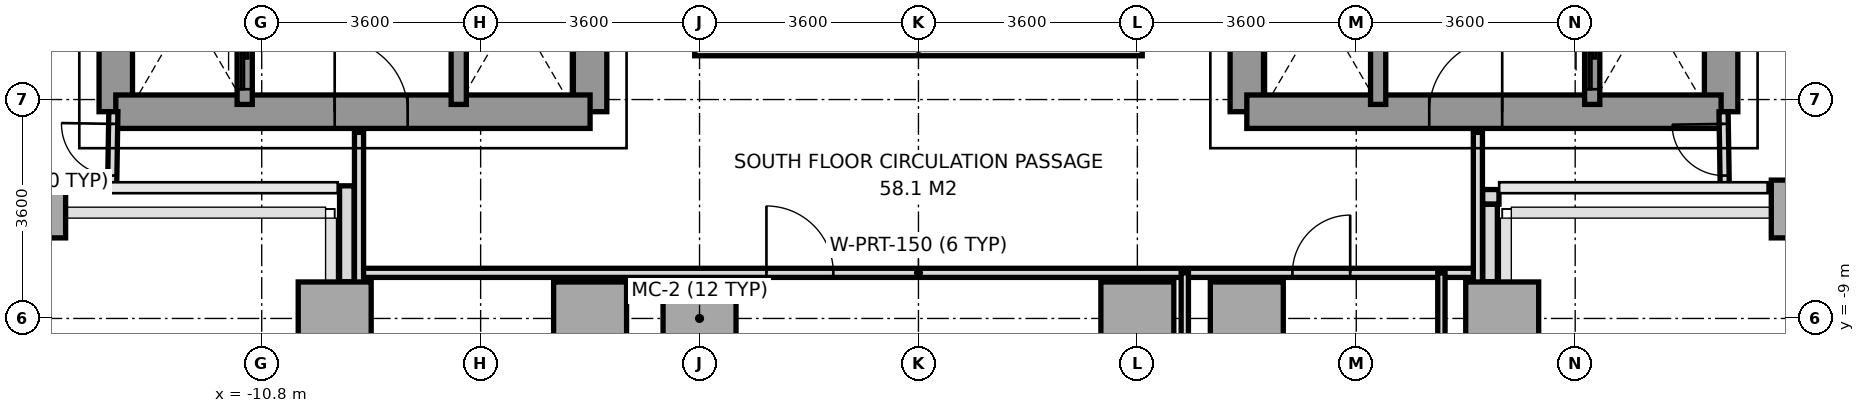
"""IFC4 building model, lengths in metres.
Left out: names, types, materials, properties, quantities, classifications, styles, units other than length and angle.
Written with IfcOpenShell. Run it as: python <this file> out.ifc"""

import sys

from ifc_helpers import new_model, si_unit, direction, frame, frame_2d, origin, origin_2d, place, context, subcontext, project, spatial, rectangle, extrude, source, transform, mapped, element, fill, save


model = new_model("IFC4")
c1 = context("Model", 3, precision=1e-05, world=origin(), true_north=direction((0.0, 1.0)))
c2 = subcontext(c1, "Body", "Model", "MODEL_VIEW")
j1 = project(units=[si_unit("LENGTHUNIT", "METRE"), si_unit("PLANEANGLEUNIT", "RADIAN")], contexts=[c1])
p1 = place(None, origin())
s1 = spatial("IfcSite", under=j1, at=p1, CompositionType="ELEMENT")
p2 = place(p1, origin())
s2 = spatial("IfcBuilding", under=s1, at=p2, CompositionType="ELEMENT")
p3 = place(p2, frame((0.0, 0.0, 68.0)))
s3 = spatial("IfcBuildingStorey", under=s2, at=p3, CompositionType="ELEMENT", Elevation=68.0)
m1 = source(origin(), c2, "Body", "SweptSolid", [
    extrude(rectangle(XDim=0.75, YDim=0.95, at=origin_2d()), origin(), (0.0, 0.0, 1.0), 3.2),
])
p4 = place(p3, frame((-14.4, -7.2, 0.0), z_axis=(0.0, 0.0, 1.0), x_axis=(1.0, 0.0, 0.0)))
e1 = element("IfcColumn", 1, at=p4, inside=s3, PredefinedType="COLUMN", context=c2, shape_type="MappedRepresentation", body=[
    mapped(m1, transform((0.0, 0.0, 0.0), x_axis=(1.0, 0.0, 0.0), y_axis=(0.0, 1.0, 0.0), z_axis=(0.0, 0.0, 1.0), scale=1.0)),
])
m2 = source(origin(), c2, "Body", "SweptSolid", [
    extrude(rectangle(XDim=1.2, YDim=1.2, at=origin_2d()), origin(), (0.0, 0.0, 1.0), 3.2),
])
for number, where, z_axis, x_axis in (
    (2, (-9.6, -9.0, 0.0), (0.0, 0.0, 1.0), (1.0, 0.0, 0.0)),
    (3, (-5.4, -9.0, 0.0), (0.0, 0.0, 1.0), (1.0, 0.0, 0.0)),
    (4, (-3.6, -9.0, 0.0), (0.0, 0.0, 1.0), (1.0, 0.0, 0.0)),
    (5, (3.6, -9.0, 0.0), (0.0, 0.0, 1.0), (1.0, 0.0, 0.0)),
    (6, (5.4, -9.0, 0.0), (0.0, 0.0, 1.0), (1.0, 0.0, 0.0)),
    (7, (9.6, -9.0, 0.0), (0.0, 0.0, 1.0), (1.0, 0.0, 0.0)),
):
    element("IfcColumn", number, at=place(p3, frame(where, z_axis=z_axis, x_axis=x_axis)), inside=s3, PredefinedType="COLUMN", context=c2, shape_type="MappedRepresentation", body=[
        mapped(m2, transform((0.0, 0.0, 0.0), x_axis=(1.0, 0.0, 0.0), y_axis=(0.0, 1.0, 0.0), z_axis=(0.0, 0.0, 1.0), scale=1.0)),
    ])
p5 = place(p3, frame((14.4, -7.2, 0.0), z_axis=(0.0, 0.0, 1.0), x_axis=(1.0, 0.0, 0.0)))
e8 = element("IfcColumn", 8, at=p5, inside=s3, PredefinedType="COLUMN", context=c2, shape_type="MappedRepresentation", body=[
    mapped(m1, transform((0.0, 0.0, 0.0), x_axis=(1.0, 0.0, 0.0), y_axis=(0.0, 1.0, 0.0), z_axis=(0.0, 0.0, 1.0), scale=1.0)),
])
p6 = place(p3, frame((9.547, -7.0, 0.0), z_axis=(0.0, 0.0, 1.0), x_axis=(-1.0, 0.0, 0.0)))
e9 = element("IfcWall", 9, at=p6, inside=s3, PredefinedType="PARAPET", context=c2, shape_type="SweptSolid", body=[
    extrude(rectangle(XDim=0.269, YDim=0.24, at=frame_2d((0.135, 0.0))), origin(), (0.0, 0.0, 1.0), 1.15),
])
p7 = place(p3, frame((9.4, -7.123, 0.0), z_axis=(0.0, 0.0, 1.0), x_axis=(0.0, -1.0, 0.0)))
e10 = element("IfcWall", 10, at=p7, inside=s3, PredefinedType="PARAPET", context=c2, shape_type="SweptSolid", body=[
    extrude(rectangle(XDim=1.274, YDim=0.24, at=frame_2d((0.637, 0.0))), origin(), (0.0, 0.0, 1.0), 1.15),
])
p8 = place(p3, frame((-9.4, -8.397, 0.0), z_axis=(0.0, 0.0, 1.0), x_axis=(0.0, 1.0, 0.0)))
e11 = element("IfcWall", 11, at=p8, inside=s3, PredefinedType="PARAPET", context=c2, shape_type="SweptSolid", body=[
    extrude(rectangle(XDim=1.578, YDim=0.24, at=frame_2d((0.789, 0.0))), origin(), (0.0, 0.0, 1.0), 1.15),
])
p9 = place(p3, frame((-13.2, -5.6, 0.0), z_axis=(0.0, 0.0, 1.0), x_axis=(0.0, 1.0, 0.0)))
e12 = element("IfcWall", 12, at=p9, inside=s3, PredefinedType="SHEAR", context=c2, shape_type="SweptSolid", body=[
    extrude(rectangle(XDim=11.2, YDim=0.55, at=frame_2d((5.6, 0.0))), origin(), (0.0, 0.0, 1.0), 3.2),
])
p10 = place(p3, frame((-5.4, -5.6, 0.0), z_axis=(0.0, 0.0, 1.0), x_axis=(0.0, 1.0, 0.0)))
e13 = element("IfcWall", 13, at=p10, inside=s3, PredefinedType="SHEAR", context=c2, shape_type="SweptSolid", body=[
    extrude(rectangle(XDim=12.5, YDim=0.55, at=frame_2d((6.25, 0.0))), origin(), (0.0, 0.0, 1.0), 3.2),
])
p11 = place(p10, frame((4.55, 0.0, 0.0)))
e14 = element("IfcOpeningElement", 14, at=p11, cuts=e13, PredefinedType="OPENING", context=c2, shape_type="SweptSolid", body=[
    extrude(rectangle(XDim=1.2, YDim=2.2, at=frame_2d((0.6, 1.1))), frame((0.0, 0.285, 0.0), z_axis=(0.0, -1.0, 0.0), x_axis=(1.0, 0.0, 0.0)), (0.0, 0.0, 1.0), 0.57),
])
p12 = place(p3, frame((-13.2, -5.6, 0.0), z_axis=(0.0, 0.0, 1.0), x_axis=(1.0, 0.0, 0.0)))
e15 = element("IfcWall", 15, at=p12, inside=s3, PredefinedType="SHEAR", context=c2, shape_type="SweptSolid", body=[
    extrude(rectangle(XDim=7.8, YDim=0.55, at=frame_2d((3.9, 0.0))), origin(), (0.0, 0.0, 1.0), 3.2),
])
p13 = place(p12, frame((3.6, 0.0, 0.0)))
e16 = element("IfcOpeningElement", 16, at=p13, cuts=e15, PredefinedType="OPENING", context=c2, shape_type="SweptSolid", body=[
    extrude(rectangle(XDim=1.2, YDim=2.2, at=frame_2d((0.6, 1.1))), frame((0.0, 0.285, 0.0), z_axis=(0.0, -1.0, 0.0), x_axis=(1.0, 0.0, 0.0)), (0.0, 0.0, 1.0), 0.57),
])
p14 = place(p3, frame((13.2, -5.6, 0.0), z_axis=(0.0, 0.0, 1.0), x_axis=(0.0, 1.0, 0.0)))
e17 = element("IfcWall", 17, at=p14, inside=s3, PredefinedType="SHEAR", context=c2, shape_type="SweptSolid", body=[
    extrude(rectangle(XDim=11.2, YDim=0.55, at=frame_2d((5.6, 0.0))), origin(), (0.0, 0.0, 1.0), 3.2),
])
p15 = place(p3, frame((5.4, -5.6, 0.0), z_axis=(0.0, 0.0, 1.0), x_axis=(0.0, 1.0, 0.0)))
e18 = element("IfcWall", 18, at=p15, inside=s3, PredefinedType="SHEAR", context=c2, shape_type="SweptSolid", body=[
    extrude(rectangle(XDim=12.5, YDim=0.55, at=frame_2d((6.25, 0.0))), origin(), (0.0, 0.0, 1.0), 3.2),
])
p16 = place(p15, frame((4.55, 0.0, 0.0)))
e19 = element("IfcOpeningElement", 19, at=p16, cuts=e18, PredefinedType="OPENING", context=c2, shape_type="SweptSolid", body=[
    extrude(rectangle(XDim=1.2, YDim=2.2, at=frame_2d((0.6, 1.1))), frame((0.0, 0.285, 0.0), z_axis=(0.0, -1.0, 0.0), x_axis=(1.0, 0.0, 0.0)), (0.0, 0.0, 1.0), 0.57),
])
p17 = place(p15, frame((7.88, 0.0, 0.0)))
e20 = element("IfcOpeningElement", 20, at=p17, cuts=e18, PredefinedType="OPENING", context=c2, shape_type="SweptSolid", body=[
    extrude(rectangle(XDim=0.8, YDim=2.1, at=frame_2d((0.4, 1.05))), frame((0.0, 0.285, 0.0), z_axis=(0.0, -1.0, 0.0), x_axis=(1.0, 0.0, 0.0)), (0.0, 0.0, 1.0), 0.57),
])
p18 = place(p3, frame((5.4, -5.6, 0.0), z_axis=(0.0, 0.0, 1.0), x_axis=(1.0, 0.0, 0.0)))
e21 = element("IfcWall", 21, at=p18, inside=s3, PredefinedType="SHEAR", context=c2, shape_type="SweptSolid", body=[
    extrude(rectangle(XDim=7.8, YDim=0.55, at=frame_2d((3.9, 0.0))), origin(), (0.0, 0.0, 1.0), 3.2),
])
p19 = place(p18, frame((3.0, 0.0, 0.0)))
e22 = element("IfcOpeningElement", 22, at=p19, cuts=e21, PredefinedType="OPENING", context=c2, shape_type="SweptSolid", body=[
    extrude(rectangle(XDim=1.2, YDim=2.2, at=frame_2d((0.6, 1.1))), frame((0.0, 0.285, 0.0), z_axis=(0.0, -1.0, 0.0), x_axis=(1.0, 0.0, 0.0)), (0.0, 0.0, 1.0), 0.57),
])
p20 = place(p3, frame((-11.08, -5.48, 0.0), z_axis=(0.0, 0.0, 1.0), x_axis=(0.0, 1.0, 0.0)))
e23 = element("IfcWall", 23, at=p20, inside=s3, PredefinedType="SOLIDWALL", context=c2, shape_type="SweptSolid", body=[
    extrude(rectangle(XDim=1.6, YDim=0.25, at=frame_2d((0.8, 0.0))), origin(), (0.0, 0.0, 1.0), 3.2),
])
p21 = place(p20, frame((0.25, 0.0, 0.0)))
e24 = element("IfcOpeningElement", 24, at=p21, cuts=e23, PredefinedType="OPENING", context=c2, shape_type="SweptSolid", body=[
    extrude(rectangle(XDim=1.1, YDim=2.2, at=frame_2d((0.55, 1.1))), frame((0.0, 0.135, 0.0), z_axis=(0.0, -1.0, 0.0), x_axis=(1.0, 0.0, 0.0)), (0.0, 0.0, 1.0), 0.27),
])
p22 = place(p3, frame((11.08, -5.48, 0.0), z_axis=(0.0, 0.0, 1.0), x_axis=(0.0, 1.0, 0.0)))
e25 = element("IfcWall", 25, at=p22, inside=s3, PredefinedType="SOLIDWALL", context=c2, shape_type="SweptSolid", body=[
    extrude(rectangle(XDim=1.6, YDim=0.25, at=frame_2d((0.8, 0.0))), origin(), (0.0, 0.0, 1.0), 3.2),
])
p23 = place(p22, frame((0.25, 0.0, 0.0)))
e26 = element("IfcOpeningElement", 26, at=p23, cuts=e25, PredefinedType="OPENING", context=c2, shape_type="SweptSolid", body=[
    extrude(rectangle(XDim=1.1, YDim=2.2, at=frame_2d((0.55, 1.1))), frame((0.0, 0.135, 0.0), z_axis=(0.0, -1.0, 0.0), x_axis=(1.0, 0.0, 0.0)), (0.0, 0.0, 1.0), 0.27),
])
for number, where, z_axis, x_axis in (
    (27, (-7.56, -5.48, 0.0), (0.0, 0.0, 1.0), (0.0, 1.0, 0.0)),
    (28, (7.56, -5.48, 0.0), (0.0, 0.0, 1.0), (0.0, 1.0, 0.0)),
):
    element("IfcWall", number, at=place(p3, frame(where, z_axis=z_axis, x_axis=x_axis)), inside=s3, PredefinedType="SOLIDWALL", context=c2, shape_type="SweptSolid", body=[
        extrude(rectangle(XDim=1.6, YDim=0.25, at=frame_2d((0.8, 0.0))), origin(), (0.0, 0.0, 1.0), 3.2),
    ])
p24 = place(p3, frame((-9.2, -8.25, 0.0), z_axis=(0.0, 0.0, 1.0), x_axis=(1.0, 0.0, 0.0)))
e29 = element("IfcWall", 29, at=p24, inside=s3, PredefinedType="PARTITIONING", context=c2, shape_type="SweptSolid", body=[
    extrude(rectangle(XDim=18.4, YDim=0.15, at=frame_2d((9.2, 0.0))), origin(), (0.0, 0.0, 1.0), 2.7),
])
p25 = place(p24, frame((15.35, 0.0, 0.0)))
e30 = element("IfcOpeningElement", 30, at=p25, cuts=e29, PredefinedType="OPENING", context=c2, shape_type="SweptSolid", body=[
    extrude(rectangle(XDim=0.95, YDim=2.15, at=frame_2d((0.475, 1.075))), frame((0.0, 0.085, 0.0), z_axis=(0.0, -1.0, 0.0), x_axis=(1.0, 0.0, 0.0)), (0.0, 0.0, 1.0), 0.17),
])
p26 = place(p24, frame((6.7, 0.0, 0.0)))
e31 = element("IfcOpeningElement", 31, at=p26, cuts=e29, PredefinedType="OPENING", context=c2, shape_type="SweptSolid", body=[
    extrude(rectangle(XDim=1.1, YDim=2.2, at=frame_2d((0.55, 1.1))), frame((0.0, 0.085, 0.0), z_axis=(0.0, -1.0, 0.0), x_axis=(1.0, 0.0, 0.0)), (0.0, 0.0, 1.0), 0.17),
])
for number, where, z_axis, x_axis in (
    (32, (-9.2, -15.68, 0.0), (0.0, 0.0, 1.0), (0.0, 1.0, 0.0)),
    (33, (9.2, -15.68, 0.0), (0.0, 0.0, 1.0), (0.0, 1.0, 0.0)),
):
    element("IfcWall", number, at=place(p3, frame(where, z_axis=z_axis, x_axis=x_axis)), inside=s3, PredefinedType="PARTITIONING", context=c2, shape_type="SweptSolid", body=[
        extrude(rectangle(XDim=9.74, YDim=0.15, at=frame_2d((4.87, 0.0))), origin(), (0.0, 0.0, 1.0), 2.71),
    ])
p27 = place(p3, frame((4.38, -11.8, 0.0), z_axis=(0.0, 0.0, 1.0), x_axis=(0.0, 1.0, 0.0)))
e34 = element("IfcWall", 34, at=p27, inside=s3, PredefinedType="PARTITIONING", context=c2, shape_type="SweptSolid", body=[
    extrude(rectangle(XDim=3.55, YDim=0.12, at=frame_2d((1.775, 0.0))), origin(), (0.0, 0.0, 1.0), 3.2),
])
p28 = place(p3, frame((8.6, -11.8, 0.0), z_axis=(0.0, 0.0, 1.0), x_axis=(0.0, 1.0, 0.0)))
e35 = element("IfcWall", 35, at=p28, inside=s3, PredefinedType="PARTITIONING", context=c2, shape_type="SweptSolid", body=[
    extrude(rectangle(XDim=3.55, YDim=0.12, at=frame_2d((1.775, 0.0))), origin(), (0.0, 0.0, 1.0), 2.71),
])
p29 = place(p3, frame((-13.26, -6.85, 0.0), z_axis=(0.0, 0.0, 1.0), x_axis=(0.016013571389, 0.999871774545, 0.0)))
e36 = element("IfcWall", 36, at=p29, inside=s3, PredefinedType="PARTITIONING", context=c2, shape_type="SweptSolid", body=[
    extrude(rectangle(XDim=1.25, YDim=0.15, at=frame_2d((0.625, 0.0))), origin(), (0.0, 0.0, 1.0), 3.2),
])
p30 = place(p29, frame((0.2, 0.0, 0.0)))
e37 = element("IfcOpeningElement", 37, at=p30, cuts=e36, PredefinedType="OPENING", context=c2, shape_type="SweptSolid", body=[
    extrude(rectangle(XDim=0.85, YDim=2.1, at=frame_2d((0.425, 1.05))), frame((0.0, 0.085, 0.0), z_axis=(0.0, -1.0, 0.0), x_axis=(1.0, 0.0, 0.0)), (0.0, 0.0, 1.0), 0.17),
])
p31 = place(p3, frame((13.26, -6.85, 0.0), z_axis=(0.0, 0.0, 1.0), x_axis=(-0.016013571389, 0.999871774545, 0.0)))
e38 = element("IfcWall", 38, at=p31, inside=s3, PredefinedType="PARTITIONING", context=c2, shape_type="SweptSolid", body=[
    extrude(rectangle(XDim=1.25, YDim=0.15, at=frame_2d((0.625, 0.0))), origin(), (0.0, 0.0, 1.0), 3.2),
])
p32 = place(p31, frame((0.2, 0.0, 0.0)))
e39 = element("IfcOpeningElement", 39, at=p32, cuts=e38, PredefinedType="OPENING", context=c2, shape_type="SweptSolid", body=[
    extrude(rectangle(XDim=0.85, YDim=2.1, at=frame_2d((0.425, 1.05))), frame((0.0, 0.085, 0.0), z_axis=(0.0, -1.0, 0.0), x_axis=(1.0, 0.0, 0.0)), (0.0, 0.0, 1.0), 0.17),
])
p33 = place(p3, frame((-3.68, -4.56, 0.0), z_axis=(0.0, 0.0, 1.0), x_axis=(1.0, 0.0, 0.0)))
e40 = element("IfcWall", 40, at=p33, inside=s3, PredefinedType="PARAPET", context=c2, shape_type="SweptSolid", body=[
    extrude(rectangle(XDim=7.36, YDim=0.24, at=frame_2d((3.68, 0.0))), origin(), (0.0, 0.0, 1.0), 1.15),
])
m3 = source(origin(), c2, "Body", "SweptSolid", [
    extrude(rectangle(XDim=1.2, YDim=2.2, at=frame_2d((0.6, 1.1))), frame((0.0, 0.025, 0.0), z_axis=(0.0, -1.0, 0.0), x_axis=(1.0, 0.0, 0.0)), (0.0, 0.0, 1.0), 0.05),
])
p34 = place(p13, origin())
e41 = element("IfcDoor", 41, at=p34, inside=s3, OperationType="SINGLE_SWING_LEFT", PredefinedType="DOOR", context=c2, shape_type="MappedRepresentation", body=[
    mapped(m3, transform((0.0, 0.0, 0.0), x_axis=(1.0, 0.0, 0.0), y_axis=(0.0, 1.0, 0.0), z_axis=(0.0, 0.0, 1.0), scale=1.0)),
])
fill(e16, e41)
p35 = place(p19, origin())
e42 = element("IfcDoor", 42, at=p35, inside=s3, OperationType="SINGLE_SWING_RIGHT", PredefinedType="DOOR", context=c2, shape_type="MappedRepresentation", body=[
    mapped(m3, transform((0.0, 0.0, 0.0), x_axis=(1.0, 0.0, 0.0), y_axis=(0.0, 1.0, 0.0), z_axis=(0.0, 0.0, 1.0), scale=1.0)),
])
fill(e22, e42)
m4 = source(origin(), c2, "Body", "SweptSolid", [
    extrude(rectangle(XDim=1.1, YDim=2.2, at=frame_2d((0.55, 1.1))), frame((0.0, 0.025, 0.0), z_axis=(0.0, -1.0, 0.0), x_axis=(1.0, 0.0, 0.0)), (0.0, 0.0, 1.0), 0.05),
])
p36 = place(p21, origin())
e43 = element("IfcDoor", 43, at=p36, inside=s3, OperationType="SLIDING_TO_LEFT", PredefinedType="DOOR", context=c2, shape_type="MappedRepresentation", body=[
    mapped(m4, transform((0.0, 0.0, 0.0), x_axis=(1.0, 0.0, 0.0), y_axis=(0.0, 1.0, 0.0), z_axis=(0.0, 0.0, 1.0), scale=1.0)),
])
fill(e24, e43)
p37 = place(p23, origin())
e44 = element("IfcDoor", 44, at=p37, inside=s3, OperationType="SLIDING_TO_LEFT", PredefinedType="DOOR", context=c2, shape_type="MappedRepresentation", body=[
    mapped(m4, transform((0.0, 0.0, 0.0), x_axis=(1.0, 0.0, 0.0), y_axis=(0.0, 1.0, 0.0), z_axis=(0.0, 0.0, 1.0), scale=1.0)),
])
fill(e26, e44)
m5 = source(origin(), c2, "Body", "SweptSolid", [
    extrude(rectangle(XDim=0.95, YDim=2.15, at=frame_2d((0.475, 1.075))), frame((0.0, 0.025, 0.0), z_axis=(0.0, -1.0, 0.0), x_axis=(1.0, 0.0, 0.0)), (0.0, 0.0, 1.0), 0.05),
])
p38 = place(p25, origin())
e45 = element("IfcDoor", 45, at=p38, inside=s3, OperationType="SINGLE_SWING_RIGHT", PredefinedType="DOOR", context=c2, shape_type="MappedRepresentation", body=[
    mapped(m5, transform((0.0, 0.0, 0.0), x_axis=(1.0, 0.0, 0.0), y_axis=(0.0, 1.0, 0.0), z_axis=(0.0, 0.0, 1.0), scale=1.0)),
])
fill(e30, e45)
p39 = place(p26, origin())
e46 = element("IfcDoor", 46, at=p39, inside=s3, OperationType="SINGLE_SWING_LEFT", PredefinedType="DOOR", context=c2, shape_type="MappedRepresentation", body=[
    mapped(m4, transform((0.0, 0.0, 0.0), x_axis=(1.0, 0.0, 0.0), y_axis=(0.0, 1.0, 0.0), z_axis=(0.0, 0.0, 1.0), scale=1.0)),
])
fill(e31, e46)
m6 = source(origin(), c2, "Body", "SweptSolid", [
    extrude(rectangle(XDim=0.85, YDim=2.1, at=frame_2d((0.425, 1.05))), frame((0.0, 0.025, 0.0), z_axis=(0.0, -1.0, 0.0), x_axis=(1.0, 0.0, 0.0)), (0.0, 0.0, 1.0), 0.05),
])
p40 = place(p30, origin())
e47 = element("IfcDoor", 47, at=p40, inside=s3, OperationType="SINGLE_SWING_RIGHT", PredefinedType="DOOR", context=c2, shape_type="MappedRepresentation", body=[
    mapped(m6, transform((0.0, 0.0, 0.0), x_axis=(1.0, 0.0, 0.0), y_axis=(0.0, 1.0, 0.0), z_axis=(0.0, 0.0, 1.0), scale=1.0)),
])
fill(e37, e47)
p41 = place(p32, origin())
e48 = element("IfcDoor", 48, at=p41, inside=s3, OperationType="SINGLE_SWING_RIGHT", PredefinedType="DOOR", context=c2, shape_type="MappedRepresentation", body=[
    mapped(m6, transform((0.0, 0.0, 0.0), x_axis=(1.0, 0.0, 0.0), y_axis=(0.0, 1.0, 0.0), z_axis=(0.0, 0.0, 1.0), scale=1.0)),
])
fill(e39, e48)
save(model, sys.argv[1])
